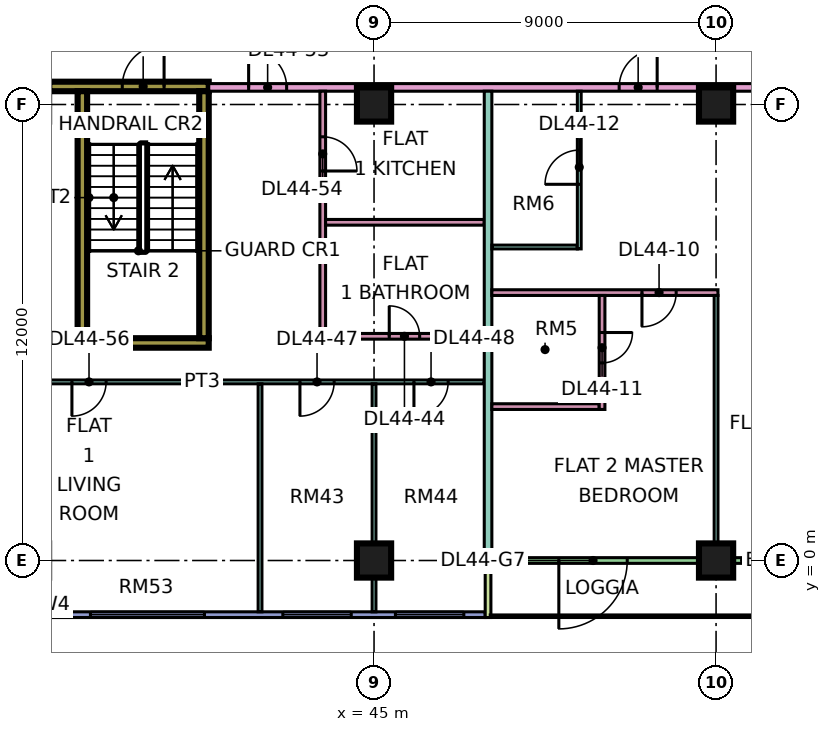
"""IFC4 building model, lengths in metres.
Left out: names, types, materials, properties, quantities, classifications, styles, units other than length and angle.
Written with IfcOpenShell. Run it as: python <this file> out.ifc"""

import sys

from ifc_helpers import new_model, si_unit, direction, frame, frame_2d, origin, origin_2d, place, context, subcontext, project, spatial, rectangle, extrude, element, fill, save


model = new_model("IFC4")
c1 = context("Model", 3, precision=1e-05, world=origin(), true_north=direction((0.0, 1.0)))
c2 = subcontext(c1, "Body", "Model", "MODEL_VIEW")
j1 = project(units=[si_unit("LENGTHUNIT", "METRE"), si_unit("PLANEANGLEUNIT", "RADIAN")], contexts=[c1])
p1 = place(None, origin())
s1 = spatial("IfcSite", under=j1, at=p1, CompositionType="ELEMENT")
p2 = place(p1, origin())
s2 = spatial("IfcBuilding", under=s1, at=p2, CompositionType="ELEMENT")
p3 = place(p2, frame((0.0, 0.0, 191.15)))
s3 = spatial("IfcBuildingStorey", under=s2, at=p3, CompositionType="ELEMENT", Elevation=191.15)
for number, where, z_axis, x_axis in (
    (1, (45.0, 0.0, 0.0), (0.0, 0.0, 1.0), (1.0, 0.0, 0.0)),
    (2, (45.0, 12.0, 0.0), (0.0, 0.0, 1.0), (1.0, 0.0, 0.0)),
    (3, (54.0, 0.0, 0.0), (0.0, 0.0, 1.0), (1.0, 0.0, 0.0)),
    (4, (54.0, 12.0, 0.0), (0.0, 0.0, 1.0), (1.0, 0.0, 0.0)),
):
    element("IfcColumn", number, at=place(p3, frame(where, z_axis=z_axis, x_axis=x_axis)), inside=s3, PredefinedType="COLUMN", context=c2, shape_type="SweptSolid", body=[
        extrude(rectangle(XDim=0.9, YDim=0.9, at=origin_2d()), origin(), (0.0, 0.0, 1.0), 3.75),
    ])
p4 = place(p3, frame((37.2, 5.725, 0.0), z_axis=(0.0, 0.0, 1.0), x_axis=(1.0, 0.0, 0.0)))
e5 = element("IfcWall", 5, at=p4, inside=s3, PredefinedType="SHEAR", context=c2, shape_type="SweptSolid", body=[
    extrude(rectangle(XDim=3.45, YDim=0.25, at=frame_2d((1.725, 0.0))), origin(), (0.0, 0.0, 1.0), 3.75),
])
p5 = place(p3, frame((36.45, 12.475, 0.0), z_axis=(0.0, 0.0, 1.0), x_axis=(1.0, 0.0, 0.0)))
e6 = element("IfcWall", 6, at=p5, inside=s3, PredefinedType="SHEAR", context=c2, shape_type="SweptSolid", body=[
    extrude(rectangle(XDim=4.2, YDim=0.25, at=frame_2d((2.1, 0.0))), origin(), (0.0, 0.0, 1.0), 3.75),
])
p6 = place(p5, frame((1.925, 0.0, 0.0)))
e7 = element("IfcOpeningElement", 7, at=p6, cuts=e6, PredefinedType="OPENING", context=c2, shape_type="SweptSolid", body=[
    extrude(rectangle(XDim=1.1, YDim=2.2, at=frame_2d((0.55, 1.1))), frame((0.0, 0.135, 0.0), z_axis=(0.0, -1.0, 0.0), x_axis=(1.0, 0.0, 0.0)), (0.0, 0.0, 1.0), 0.27),
])
for number, where, z_axis, x_axis in (
    (8, (37.325, 5.85, 0.0), (0.0, 0.0, 1.0), (0.0, 1.0, 0.0)),
    (9, (40.525, 5.85, 0.0), (0.0, 0.0, 1.0), (0.0, 1.0, 0.0)),
):
    element("IfcWall", number, at=place(p3, frame(where, z_axis=z_axis, x_axis=x_axis)), inside=s3, PredefinedType="SHEAR", context=c2, shape_type="SweptSolid", body=[
        extrude(rectangle(XDim=6.5, YDim=0.25, at=frame_2d((3.25, 0.0))), origin(), (0.0, 0.0, 1.0), 3.75),
    ])
p7 = place(p3, frame((36.075, -1.425, 0.0), z_axis=(0.0, 0.0, 1.0), x_axis=(1.0, 0.0, 0.0)))
e10 = element("IfcWall", 10, at=p7, inside=s3, PredefinedType="SOLIDWALL", context=c2, shape_type="SweptSolid", body=[
    extrude(rectangle(XDim=11.85, YDim=0.15, at=frame_2d((5.925, 0.0))), origin(), (0.0, 0.0, 1.0), 3.35),
])
p8 = place(p7, frame((1.462, 0.0, 0.45)))
e11 = element("IfcOpeningElement", 11, at=p8, cuts=e10, PredefinedType="OPENING", context=c2, shape_type="SweptSolid", body=[
    extrude(rectangle(XDim=3.0, YDim=2.4, at=frame_2d((1.5, 1.2))), frame((0.0, 0.085, 0.0), z_axis=(0.0, -1.0, 0.0), x_axis=(1.0, 0.0, 0.0)), (0.0, 0.0, 1.0), 0.17),
])
p9 = place(p7, frame((6.525, 0.0, 0.45)))
e12 = element("IfcOpeningElement", 12, at=p9, cuts=e10, PredefinedType="OPENING", context=c2, shape_type="SweptSolid", body=[
    extrude(rectangle(XDim=1.8, YDim=2.4, at=frame_2d((0.9, 1.2))), frame((0.0, 0.085, 0.0), z_axis=(0.0, -1.0, 0.0), x_axis=(1.0, 0.0, 0.0)), (0.0, 0.0, 1.0), 0.17),
])
p10 = place(p7, frame((9.488, 0.0, 0.45)))
e13 = element("IfcOpeningElement", 13, at=p10, cuts=e10, PredefinedType="OPENING", context=c2, shape_type="SweptSolid", body=[
    extrude(rectangle(XDim=1.8, YDim=2.4, at=frame_2d((0.9, 1.2))), frame((0.0, 0.085, 0.0), z_axis=(0.0, -1.0, 0.0), x_axis=(1.0, 0.0, 0.0)), (0.0, 0.0, 1.0), 0.17),
])
p11 = place(p3, frame((48.075, 0.0, 0.0), z_axis=(0.0, 0.0, 1.0), x_axis=(1.0, 0.0, 0.0)))
e14 = element("IfcWall", 14, at=p11, inside=s3, PredefinedType="SOLIDWALL", context=c2, shape_type="SweptSolid", body=[
    extrude(rectangle(XDim=13.35, YDim=0.15, at=frame_2d((6.675, 0.0))), origin(), (0.0, 0.0, 1.0), 3.35),
])
p12 = place(p11, frame((1.788, 0.0, 0.0)))
e15 = element("IfcOpeningElement", 15, at=p12, cuts=e14, PredefinedType="OPENING", context=c2, shape_type="SweptSolid", body=[
    extrude(rectangle(XDim=1.8, YDim=2.4, at=frame_2d((0.9, 1.2))), frame((0.0, 0.085, 0.0), z_axis=(0.0, -1.0, 0.0), x_axis=(1.0, 0.0, 0.0)), (0.0, 0.0, 1.0), 0.17),
])
p13 = place(p11, frame((7.7, 0.0, 0.45)))
e16 = element("IfcOpeningElement", 16, at=p13, cuts=e14, PredefinedType="OPENING", context=c2, shape_type="SweptSolid", body=[
    extrude(rectangle(XDim=3.0, YDim=2.4, at=frame_2d((1.5, 1.2))), frame((0.0, 0.085, 0.0), z_axis=(0.0, -1.0, 0.0), x_axis=(1.0, 0.0, 0.0)), (0.0, 0.0, 1.0), 0.17),
])
p14 = place(p11, frame((12.188, 0.0, 0.45)))
e17 = element("IfcOpeningElement", 17, at=p14, cuts=e14, PredefinedType="OPENING", context=c2, shape_type="SweptSolid", body=[
    extrude(rectangle(XDim=0.9, YDim=2.4, at=frame_2d((0.45, 1.2))), frame((0.0, 0.085, 0.0), z_axis=(0.0, -1.0, 0.0), x_axis=(1.0, 0.0, 0.0)), (0.0, 0.0, 1.0), 0.17),
])
p15 = place(p3, frame((48.0, -1.5, 0.0), z_axis=(0.0, 0.0, 1.0), x_axis=(0.0, 1.0, 0.0)))
e18 = element("IfcWall", 18, at=p15, inside=s3, PredefinedType="SOLIDWALL", context=c2, shape_type="SweptSolid", body=[
    extrude(rectangle(XDim=1.5, YDim=0.15, at=frame_2d((0.75, 0.0))), origin(), (0.0, 0.0, 1.0), 3.35),
])
p16 = place(p3, frame((33.05, 4.7, 0.0), z_axis=(0.0, 0.0, 1.0), x_axis=(1.0, 0.0, 0.0)))
e19 = element("IfcWall", 19, at=p16, inside=s3, PredefinedType="PARTITIONING", context=c2, shape_type="SweptSolid", body=[
    extrude(rectangle(XDim=14.85, YDim=0.1, at=frame_2d((7.425, 0.0))), origin(), (0.0, 0.0, 1.0), 3.35),
])
p17 = place(p16, frame((10.0, 0.0, 0.0)))
e20 = element("IfcOpeningElement", 20, at=p17, cuts=e19, PredefinedType="OPENING", context=c2, shape_type="SweptSolid", body=[
    extrude(rectangle(XDim=0.9, YDim=2.1, at=frame_2d((0.45, 1.05))), frame((0.0, 0.06, 0.0), z_axis=(0.0, -1.0, 0.0), x_axis=(1.0, 0.0, 0.0)), (0.0, 0.0, 1.0), 0.12),
])
p18 = place(p16, frame((13.0, 0.0, 0.0)))
e21 = element("IfcOpeningElement", 21, at=p18, cuts=e19, PredefinedType="OPENING", context=c2, shape_type="SweptSolid", body=[
    extrude(rectangle(XDim=0.9, YDim=2.1, at=frame_2d((0.45, 1.05))), frame((0.0, 0.06, 0.0), z_axis=(0.0, -1.0, 0.0), x_axis=(1.0, 0.0, 0.0)), (0.0, 0.0, 1.0), 0.12),
])
p19 = place(p16, frame((4.0, 0.0, 0.0)))
e22 = element("IfcOpeningElement", 22, at=p19, cuts=e19, PredefinedType="OPENING", context=c2, shape_type="SweptSolid", body=[
    extrude(rectangle(XDim=0.9, YDim=2.1, at=frame_2d((0.45, 1.05))), frame((0.0, 0.06, 0.0), z_axis=(0.0, -1.0, 0.0), x_axis=(1.0, 0.0, 0.0)), (0.0, 0.0, 1.0), 0.12),
])
p20 = place(p3, frame((40.65, 12.45, 0.0), z_axis=(0.0, 0.0, 1.0), x_axis=(1.0, 0.0, 0.0)))
e23 = element("IfcWall", 23, at=p20, inside=s3, PredefinedType="PARTITIONING", context=c2, shape_type="SweptSolid", body=[
    extrude(rectangle(XDim=22.35, YDim=0.2, at=frame_2d((11.175, 0.0))), origin(), (0.0, 0.0, 1.0), 3.35),
])
p21 = place(p20, frame((10.8, 0.0, 0.0)))
e24 = element("IfcOpeningElement", 24, at=p21, cuts=e23, PredefinedType="OPENING", context=c2, shape_type="SweptSolid", body=[
    extrude(rectangle(XDim=1.0, YDim=2.1, at=frame_2d((0.5, 1.05))), frame((0.0, 0.11, 0.0), z_axis=(0.0, -1.0, 0.0), x_axis=(1.0, 0.0, 0.0)), (0.0, 0.0, 1.0), 0.22),
])
p22 = place(p20, frame((1.05, 0.0, 0.0)))
e25 = element("IfcOpeningElement", 25, at=p22, cuts=e23, PredefinedType="OPENING", context=c2, shape_type="SweptSolid", body=[
    extrude(rectangle(XDim=1.0, YDim=2.1, at=frame_2d((0.5, 1.05))), frame((0.0, 0.11, 0.0), z_axis=(0.0, -1.0, 0.0), x_axis=(1.0, 0.0, 0.0)), (0.0, 0.0, 1.0), 0.22),
])
p23 = place(p3, frame((42.0, -1.35, 0.0), z_axis=(0.0, 0.0, 1.0), x_axis=(0.0, 1.0, 0.0)))
e26 = element("IfcWall", 26, at=p23, inside=s3, PredefinedType="PARTITIONING", context=c2, shape_type="SweptSolid", body=[
    extrude(rectangle(XDim=6.0, YDim=0.1, at=frame_2d((3.0, 0.0))), origin(), (0.0, 0.0, 1.0), 3.35),
])
p24 = place(p3, frame((43.65, 5.825, 0.0), z_axis=(0.0, 0.0, 1.0), x_axis=(0.0, 1.0, 0.0)))
e27 = element("IfcWall", 27, at=p24, inside=s3, PredefinedType="PARTITIONING", context=c2, shape_type="SweptSolid", body=[
    extrude(rectangle(XDim=6.525, YDim=0.15, at=frame_2d((3.263, 0.0))), origin(), (0.0, 0.0, 1.0), 3.35),
])
p25 = place(p24, frame((4.425, 0.0, 0.0)))
e28 = element("IfcOpeningElement", 28, at=p25, cuts=e27, PredefinedType="OPENING", context=c2, shape_type="SweptSolid", body=[
    extrude(rectangle(XDim=0.9, YDim=2.1, at=frame_2d((0.45, 1.05))), frame((0.0, 0.085, 0.0), z_axis=(0.0, -1.0, 0.0), x_axis=(1.0, 0.0, 0.0)), (0.0, 0.0, 1.0), 0.17),
])
p26 = place(p3, frame((43.725, 5.9, 0.0), z_axis=(0.0, 0.0, 1.0), x_axis=(1.0, 0.0, 0.0)))
e29 = element("IfcWall", 29, at=p26, inside=s3, PredefinedType="PARTITIONING", context=c2, shape_type="SweptSolid", body=[
    extrude(rectangle(XDim=4.175, YDim=0.15, at=frame_2d((2.087, 0.0))), origin(), (0.0, 0.0, 1.0), 3.35),
])
p27 = place(p26, frame((1.675, 0.0, 0.0)))
e30 = element("IfcOpeningElement", 30, at=p27, cuts=e29, PredefinedType="OPENING", context=c2, shape_type="SweptSolid", body=[
    extrude(rectangle(XDim=0.8, YDim=2.1, at=frame_2d((0.4, 1.05))), frame((0.0, 0.085, 0.0), z_axis=(0.0, -1.0, 0.0), x_axis=(1.0, 0.0, 0.0)), (0.0, 0.0, 1.0), 0.17),
])
p28 = place(p3, frame((43.725, 8.9, 0.0), z_axis=(0.0, 0.0, 1.0), x_axis=(1.0, 0.0, 0.0)))
e31 = element("IfcWall", 31, at=p28, inside=s3, PredefinedType="PARTITIONING", context=c2, shape_type="SweptSolid", body=[
    extrude(rectangle(XDim=4.175, YDim=0.15, at=frame_2d((2.087, 0.0))), origin(), (0.0, 0.0, 1.0), 3.35),
])
p29 = place(p3, frame((45.0, -1.351, 0.0), z_axis=(0.0, 0.0, 1.0), x_axis=(0.0, 1.0, 0.0)))
e32 = element("IfcWall", 32, at=p29, inside=s3, PredefinedType="PARTITIONING", context=c2, shape_type="SweptSolid", body=[
    extrude(rectangle(XDim=6.001, YDim=0.1, at=frame_2d((3.0, 0.0))), origin(), (0.0, 0.0, 1.0), 3.35),
])
p30 = place(p3, frame((48.0, 0.0, 0.0), z_axis=(0.0, 0.0, 1.0), x_axis=(0.0, 1.0, 0.0)))
e33 = element("IfcWall", 33, at=p30, inside=s3, PredefinedType="PARTITIONING", context=c2, shape_type="SweptSolid", body=[
    extrude(rectangle(XDim=12.35, YDim=0.2, at=frame_2d((6.175, 0.0))), origin(), (0.0, 0.0, 1.0), 3.35),
])
p31 = place(p3, frame((48.1, 4.05, 0.0), z_axis=(0.0, 0.0, 1.0), x_axis=(1.0, 0.0, 0.0)))
e34 = element("IfcWall", 34, at=p31, inside=s3, PredefinedType="PARTITIONING", context=c2, shape_type="SweptSolid", body=[
    extrude(rectangle(XDim=2.825, YDim=0.15, at=frame_2d((1.413, 0.0))), origin(), (0.0, 0.0, 1.0), 3.35),
])
p32 = place(p3, frame((48.1, 7.05, 0.0), z_axis=(0.0, 0.0, 1.0), x_axis=(1.0, 0.0, 0.0)))
e35 = element("IfcWall", 35, at=p32, inside=s3, PredefinedType="PARTITIONING", context=c2, shape_type="SweptSolid", body=[
    extrude(rectangle(XDim=5.95, YDim=0.15, at=frame_2d((2.975, 0.0))), origin(), (0.0, 0.0, 1.0), 3.35),
])
p33 = place(p32, frame((3.95, 0.0, 0.0)))
e36 = element("IfcOpeningElement", 36, at=p33, cuts=e35, PredefinedType="OPENING", context=c2, shape_type="SweptSolid", body=[
    extrude(rectangle(XDim=0.9, YDim=2.1, at=frame_2d((0.45, 1.05))), frame((0.0, 0.085, 0.0), z_axis=(0.0, -1.0, 0.0), x_axis=(1.0, 0.0, 0.0)), (0.0, 0.0, 1.0), 0.17),
])
p34 = place(p3, frame((48.1, 8.25, 0.0), z_axis=(0.0, 0.0, 1.0), x_axis=(1.0, 0.0, 0.0)))
e37 = element("IfcWall", 37, at=p34, inside=s3, PredefinedType="PARTITIONING", context=c2, shape_type="SweptSolid", body=[
    extrude(rectangle(XDim=2.25, YDim=0.1, at=frame_2d((1.125, 0.0))), origin(), (0.0, 0.0, 1.0), 3.35),
])
p35 = place(p3, frame((50.4, 8.2, 0.0), z_axis=(0.0, 0.0, 1.0), x_axis=(0.0, 1.0, 0.0)))
e38 = element("IfcWall", 38, at=p35, inside=s3, PredefinedType="PARTITIONING", context=c2, shape_type="SweptSolid", body=[
    extrude(rectangle(XDim=4.15, YDim=0.1, at=frame_2d((2.075, 0.0))), origin(), (0.0, 0.0, 1.0), 3.35),
])
p36 = place(p35, frame((1.7, 0.0, 0.0)))
e39 = element("IfcOpeningElement", 39, at=p36, cuts=e38, PredefinedType="OPENING", context=c2, shape_type="SweptSolid", body=[
    extrude(rectangle(XDim=0.9, YDim=2.1, at=frame_2d((0.45, 1.05))), frame((0.0, 0.06, 0.0), z_axis=(0.0, -1.0, 0.0), x_axis=(1.0, 0.0, 0.0)), (0.0, 0.0, 1.0), 0.12),
])
p37 = place(p3, frame((51.0, 3.975, 0.0), z_axis=(0.0, 0.0, 1.0), x_axis=(0.0, 1.0, 0.0)))
e40 = element("IfcWall", 40, at=p37, inside=s3, PredefinedType="PARTITIONING", context=c2, shape_type="SweptSolid", body=[
    extrude(rectangle(XDim=3.0, YDim=0.15, at=frame_2d((1.5, 0.0))), origin(), (0.0, 0.0, 1.0), 3.35),
])
p38 = place(p37, frame((1.225, 0.0, 0.0)))
e41 = element("IfcOpeningElement", 41, at=p38, cuts=e40, PredefinedType="OPENING", context=c2, shape_type="SweptSolid", body=[
    extrude(rectangle(XDim=0.8, YDim=2.1, at=frame_2d((0.4, 1.05))), frame((0.0, 0.085, 0.0), z_axis=(0.0, -1.0, 0.0), x_axis=(1.0, 0.0, 0.0)), (0.0, 0.0, 1.0), 0.17),
])
p39 = place(p3, frame((54.0, 0.074, 0.0), z_axis=(0.0, 0.0, 1.0), x_axis=(0.0, 1.0, 0.0)))
e42 = element("IfcWall", 42, at=p39, inside=s3, PredefinedType="PARTITIONING", context=c2, shape_type="SweptSolid", body=[
    extrude(rectangle(XDim=6.901, YDim=0.1, at=frame_2d((3.451, 0.0))), origin(), (0.0, 0.0, 1.0), 3.35),
])
p40 = place(p8, origin())
e43 = element("IfcWindow", 43, at=p40, inside=s3, PartitioningType="SINGLE_PANEL", PredefinedType="WINDOW", context=c2, shape_type="SweptSolid", body=[
    extrude(rectangle(XDim=3.0, YDim=2.4, at=frame_2d((1.5, 1.2))), frame((0.0, 0.03, 0.0), z_axis=(0.0, -1.0, 0.0), x_axis=(1.0, 0.0, 0.0)), (0.0, 0.0, 1.0), 0.06),
])
fill(e11, e43)
p41 = place(p9, origin())
e44 = element("IfcWindow", 44, at=p41, inside=s3, PartitioningType="SINGLE_PANEL", PredefinedType="WINDOW", context=c2, shape_type="SweptSolid", body=[
    extrude(rectangle(XDim=1.8, YDim=2.4, at=frame_2d((0.9, 1.2))), frame((0.0, 0.03, 0.0), z_axis=(0.0, -1.0, 0.0), x_axis=(1.0, 0.0, 0.0)), (0.0, 0.0, 1.0), 0.06),
])
fill(e12, e44)
p42 = place(p10, origin())
e45 = element("IfcWindow", 45, at=p42, inside=s3, PartitioningType="SINGLE_PANEL", PredefinedType="WINDOW", context=c2, shape_type="SweptSolid", body=[
    extrude(rectangle(XDim=1.8, YDim=2.4, at=frame_2d((0.9, 1.2))), frame((0.0, 0.03, 0.0), z_axis=(0.0, -1.0, 0.0), x_axis=(1.0, 0.0, 0.0)), (0.0, 0.0, 1.0), 0.06),
])
fill(e13, e45)
p43 = place(p12, frame((1.8, 0.0, 0.0), z_axis=(0.0, 0.0, 1.0), x_axis=(-1.0, 0.0, 0.0)))
e46 = element("IfcDoor", 46, at=p43, inside=s3, OperationType="DOUBLE_DOOR_SINGLE_SWING", PredefinedType="DOOR", context=c2, shape_type="SweptSolid", body=[
    extrude(rectangle(XDim=1.8, YDim=2.4, at=frame_2d((0.9, 1.2))), frame((0.0, 0.025, 0.0), z_axis=(0.0, -1.0, 0.0), x_axis=(1.0, 0.0, 0.0)), (0.0, 0.0, 1.0), 0.05),
])
fill(e15, e46)
p44 = place(p6, frame((1.1, 0.0, 0.0), z_axis=(0.0, 0.0, 1.0), x_axis=(-1.0, 0.0, 0.0)))
e47 = element("IfcDoor", 47, at=p44, inside=s3, OperationType="SINGLE_SWING_RIGHT", PredefinedType="DOOR", context=c2, shape_type="SweptSolid", body=[
    extrude(rectangle(XDim=1.1, YDim=2.2, at=frame_2d((0.55, 1.1))), frame((0.0, 0.025, 0.0), z_axis=(0.0, -1.0, 0.0), x_axis=(1.0, 0.0, 0.0)), (0.0, 0.0, 1.0), 0.05),
])
fill(e7, e47)
p45 = place(p33, frame((0.9, 0.0, 0.0), z_axis=(0.0, 0.0, 1.0), x_axis=(-1.0, 0.0, 0.0)))
e48 = element("IfcDoor", 48, at=p45, inside=s3, OperationType="SINGLE_SWING_LEFT", PredefinedType="DOOR", context=c2, shape_type="SweptSolid", body=[
    extrude(rectangle(XDim=0.9, YDim=2.1, at=frame_2d((0.45, 1.05))), frame((0.0, 0.025, 0.0), z_axis=(0.0, -1.0, 0.0), x_axis=(1.0, 0.0, 0.0)), (0.0, 0.0, 1.0), 0.05),
])
fill(e36, e48)
p46 = place(p38, origin())
e49 = element("IfcDoor", 49, at=p46, inside=s3, OperationType="SINGLE_SWING_RIGHT", PredefinedType="DOOR", context=c2, shape_type="SweptSolid", body=[
    extrude(rectangle(XDim=0.8, YDim=2.1, at=frame_2d((0.4, 1.05))), frame((0.0, 0.025, 0.0), z_axis=(0.0, -1.0, 0.0), x_axis=(1.0, 0.0, 0.0)), (0.0, 0.0, 1.0), 0.05),
])
fill(e41, e49)
p47 = place(p36, origin())
e50 = element("IfcDoor", 50, at=p47, inside=s3, OperationType="SINGLE_SWING_LEFT", PredefinedType="DOOR", context=c2, shape_type="SweptSolid", body=[
    extrude(rectangle(XDim=0.9, YDim=2.1, at=frame_2d((0.45, 1.05))), frame((0.0, 0.025, 0.0), z_axis=(0.0, -1.0, 0.0), x_axis=(1.0, 0.0, 0.0)), (0.0, 0.0, 1.0), 0.05),
])
fill(e39, e50)
p48 = place(p21, frame((1.0, 0.0, 0.0), z_axis=(0.0, 0.0, 1.0), x_axis=(-1.0, 0.0, 0.0)))
e51 = element("IfcDoor", 51, at=p48, inside=s3, OperationType="SINGLE_SWING_RIGHT", PredefinedType="DOOR", context=c2, shape_type="SweptSolid", body=[
    extrude(rectangle(XDim=1.0, YDim=2.1, at=frame_2d((0.5, 1.05))), frame((0.0, 0.025, 0.0), z_axis=(0.0, -1.0, 0.0), x_axis=(1.0, 0.0, 0.0)), (0.0, 0.0, 1.0), 0.05),
])
fill(e24, e51)
p49 = place(p27, origin())
e52 = element("IfcDoor", 52, at=p49, inside=s3, OperationType="SINGLE_SWING_LEFT", PredefinedType="DOOR", context=c2, shape_type="SweptSolid", body=[
    extrude(rectangle(XDim=0.8, YDim=2.1, at=frame_2d((0.4, 1.05))), frame((0.0, 0.025, 0.0), z_axis=(0.0, -1.0, 0.0), x_axis=(1.0, 0.0, 0.0)), (0.0, 0.0, 1.0), 0.05),
])
fill(e30, e52)
p50 = place(p17, frame((0.9, 0.0, 0.0), z_axis=(0.0, 0.0, 1.0), x_axis=(-1.0, 0.0, 0.0)))
e53 = element("IfcDoor", 53, at=p50, inside=s3, OperationType="SINGLE_SWING_LEFT", PredefinedType="DOOR", context=c2, shape_type="SweptSolid", body=[
    extrude(rectangle(XDim=0.9, YDim=2.1, at=frame_2d((0.45, 1.05))), frame((0.0, 0.025, 0.0), z_axis=(0.0, -1.0, 0.0), x_axis=(1.0, 0.0, 0.0)), (0.0, 0.0, 1.0), 0.05),
])
fill(e20, e53)
p51 = place(p18, frame((0.9, 0.0, 0.0), z_axis=(0.0, 0.0, 1.0), x_axis=(-1.0, 0.0, 0.0)))
e54 = element("IfcDoor", 54, at=p51, inside=s3, OperationType="SINGLE_SWING_LEFT", PredefinedType="DOOR", context=c2, shape_type="SweptSolid", body=[
    extrude(rectangle(XDim=0.9, YDim=2.1, at=frame_2d((0.45, 1.05))), frame((0.0, 0.025, 0.0), z_axis=(0.0, -1.0, 0.0), x_axis=(1.0, 0.0, 0.0)), (0.0, 0.0, 1.0), 0.05),
])
fill(e21, e54)
p52 = place(p22, origin())
e55 = element("IfcDoor", 55, at=p52, inside=s3, OperationType="SINGLE_SWING_LEFT", PredefinedType="DOOR", context=c2, shape_type="SweptSolid", body=[
    extrude(rectangle(XDim=1.0, YDim=2.1, at=frame_2d((0.5, 1.05))), frame((0.0, 0.025, 0.0), z_axis=(0.0, -1.0, 0.0), x_axis=(1.0, 0.0, 0.0)), (0.0, 0.0, 1.0), 0.05),
])
fill(e25, e55)
p53 = place(p25, frame((0.9, 0.0, 0.0), z_axis=(0.0, 0.0, 1.0), x_axis=(-1.0, 0.0, 0.0)))
e56 = element("IfcDoor", 56, at=p53, inside=s3, OperationType="SINGLE_SWING_LEFT", PredefinedType="DOOR", context=c2, shape_type="SweptSolid", body=[
    extrude(rectangle(XDim=0.9, YDim=2.1, at=frame_2d((0.45, 1.05))), frame((0.0, 0.025, 0.0), z_axis=(0.0, -1.0, 0.0), x_axis=(1.0, 0.0, 0.0)), (0.0, 0.0, 1.0), 0.05),
])
fill(e28, e56)
p54 = place(p19, frame((0.9, 0.0, 0.0), z_axis=(0.0, 0.0, 1.0), x_axis=(-1.0, 0.0, 0.0)))
e57 = element("IfcDoor", 57, at=p54, inside=s3, OperationType="SINGLE_SWING_LEFT", PredefinedType="DOOR", context=c2, shape_type="SweptSolid", body=[
    extrude(rectangle(XDim=0.9, YDim=2.1, at=frame_2d((0.45, 1.05))), frame((0.0, 0.025, 0.0), z_axis=(0.0, -1.0, 0.0), x_axis=(1.0, 0.0, 0.0)), (0.0, 0.0, 1.0), 0.05),
])
fill(e22, e57)
save(model, sys.argv[1])
